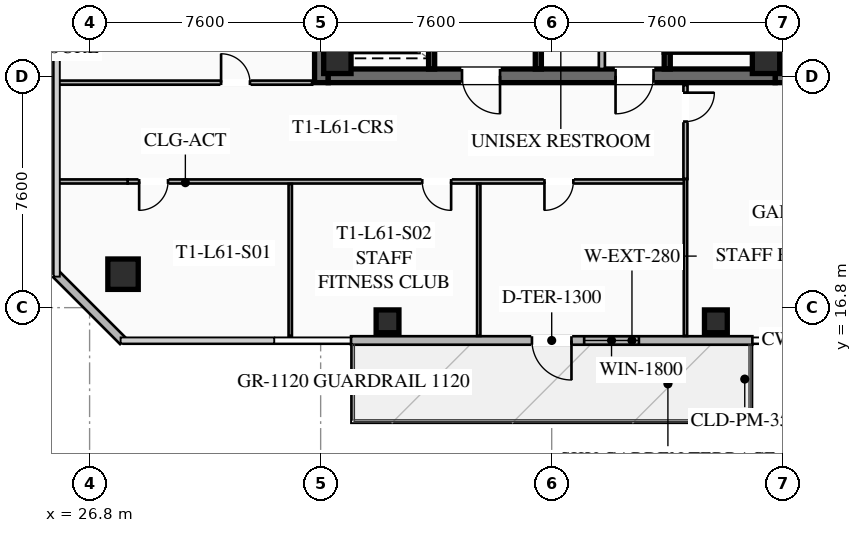
"""IFC4 building model, lengths in metres.
Left out: names, types, materials, properties, quantities, classifications, styles, units other than length and angle.
Written with IfcOpenShell. Run it as: python <this file> out.ifc"""

import sys

from ifc_helpers import new_model, si_unit, direction, frame, frame_2d, origin, origin_2d, place, context, subcontext, project, spatial, rectangle, hollow_rectangle, extrude, element, fill, save


model = new_model("IFC4")
c1 = context("Model", 3, precision=1e-05, world=origin(), true_north=direction((0.0, 1.0)))
c2 = subcontext(c1, "Body", "Model", "MODEL_VIEW")
j1 = project(units=[si_unit("LENGTHUNIT", "METRE"), si_unit("PLANEANGLEUNIT", "RADIAN")], contexts=[c1])
p1 = place(None, origin())
s1 = spatial("IfcSite", under=j1, at=p1, CompositionType="ELEMENT")
p2 = place(p1, origin())
s2 = spatial("IfcBuilding", under=s1, at=p2, CompositionType="ELEMENT")
p3 = place(p2, frame((0.0, 0.0, 225.5)))
s3 = spatial("IfcBuildingStorey", under=s2, at=p3, CompositionType="ELEMENT", Elevation=225.5)
for number, where, z_axis, x_axis in (
    (1, (34.425, 24.2, 0.0), (0.0, 0.0, 1.0), (0.0, 1.0, 0.0)),
    (2, (49.575, 39.8, 0.0), (0.0, 0.0, 1.0), (0.0, -1.0, 0.0)),
):
    element("IfcWall", number, at=place(p3, frame(where, z_axis=z_axis, x_axis=x_axis)), inside=s3, PredefinedType="SHEAR", context=c2, shape_type="SweptSolid", body=[
        extrude(rectangle(XDim=15.6, YDim=0.45, at=frame_2d((7.8, 0.0))), origin(), (0.0, 0.0, 1.0), 3.55),
    ])
p4 = place(p3, frame((49.35, 24.425, 0.0), z_axis=(0.0, 0.0, 1.0), x_axis=(-1.0, 0.0, 0.0)))
e3 = element("IfcWall", 3, at=p4, inside=s3, PredefinedType="SHEAR", context=c2, shape_type="SweptSolid", body=[
    extrude(rectangle(XDim=14.7, YDim=0.45, at=frame_2d((7.35, 0.0))), origin(), (0.0, 0.0, 1.0), 3.55),
])
p5 = place(p4, frame((9.05, 0.0, 0.0)))
e4 = element("IfcOpeningElement", 4, at=p5, cuts=e3, PredefinedType="OPENING", context=c2, shape_type="SweptSolid", body=[
    extrude(rectangle(XDim=1.25, YDim=2.25, at=frame_2d((0.625, 1.125))), frame((0.0, 0.235, 0.0), z_axis=(0.0, -1.0, 0.0), x_axis=(1.0, 0.0, 0.0)), (0.0, 0.0, 1.0), 0.47),
])
p6 = place(p4, frame((4.0, 0.0, 0.0)))
e5 = element("IfcOpeningElement", 5, at=p6, cuts=e3, PredefinedType="OPENING", context=c2, shape_type="SweptSolid", body=[
    extrude(rectangle(XDim=1.25, YDim=2.25, at=frame_2d((0.625, 1.125))), frame((0.0, 0.235, 0.0), z_axis=(0.0, -1.0, 0.0), x_axis=(1.0, 0.0, 0.0)), (0.0, 0.0, 1.0), 0.47),
])
for number, where, z_axis, x_axis in (
    (6, (34.95, 24.95, 0.0), (0.0, 0.0, 1.0), (1.0, 0.0, 0.0)),
    (7, (49.05, 24.95, 0.0), (0.0, 0.0, 1.0), (1.0, 0.0, 0.0)),
):
    element("IfcColumn", number, at=place(p3, frame(where, z_axis=z_axis, x_axis=x_axis)), inside=s3, PredefinedType="COLUMN", context=c2, shape_type="SweptSolid", body=[
        extrude(hollow_rectangle(XDim=0.9, YDim=0.9, WallThickness=0.04, at=origin_2d()), origin(), (0.0, 0.0, 1.0), 3.37),
    ])
p7 = place(p3, frame((27.9, 17.9, 0.0), z_axis=(0.0, 0.0, 1.0), x_axis=(1.0, 0.0, 0.0)))
e8 = element("IfcColumn", 8, at=p7, inside=s3, PredefinedType="COLUMN", context=c2, shape_type="SweptSolid", body=[
    extrude(hollow_rectangle(XDim=1.0, YDim=1.0, WallThickness=0.04, at=origin_2d()), origin(), (0.0, 0.0, 1.0), 3.37),
])
for number, where, z_axis, x_axis in (
    (9, (36.6, 16.35, 0.0), (0.0, 0.0, 1.0), (1.0, 0.0, 0.0)),
    (10, (47.4, 16.35, 0.0), (0.0, 0.0, 1.0), (1.0, 0.0, 0.0)),
):
    element("IfcColumn", number, at=place(p3, frame(where, z_axis=z_axis, x_axis=x_axis)), inside=s3, PredefinedType="COLUMN", context=c2, shape_type="SweptSolid", body=[
        extrude(hollow_rectangle(XDim=0.75, YDim=0.75, WallThickness=0.032, at=origin_2d()), origin(), (0.0, 0.0, 1.0), 3.37),
    ])
p8 = place(p3, frame((48.6, 15.72, 0.0), z_axis=(0.0, 0.0, 1.0), x_axis=(-1.0, 0.0, 0.0)))
e11 = element("IfcWall", 11, at=p8, inside=s3, PredefinedType="SOLIDWALL", context=c2, shape_type="SweptSolid", body=[
    extrude(rectangle(XDim=13.2, YDim=0.28, at=frame_2d((6.6, 0.0))), origin(), (0.0, 0.0, 1.0), 3.37),
])
p9 = place(p8, frame((5.95, 0.0, 0.0)))
e12 = element("IfcOpeningElement", 12, at=p9, cuts=e11, PredefinedType="OPENING", context=c2, shape_type="SweptSolid", body=[
    extrude(rectangle(XDim=1.3, YDim=2.15, at=frame_2d((0.65, 1.075))), frame((0.0, 0.15, 0.0), z_axis=(0.0, -1.0, 0.0), x_axis=(1.0, 0.0, 0.0)), (0.0, 0.0, 1.0), 0.3),
])
p10 = place(p8, frame((3.732, 0.0, 0.85)))
e13 = element("IfcOpeningElement", 13, at=p10, cuts=e11, PredefinedType="OPENING", context=c2, shape_type="SweptSolid", body=[
    extrude(rectangle(XDim=1.8, YDim=1.92, at=frame_2d((0.9, 0.96))), frame((0.0, 0.15, 0.0), z_axis=(0.0, -1.0, 0.0), x_axis=(1.0, 0.0, 0.0)), (0.0, 0.0, 1.0), 0.3),
])
p11 = place(p3, frame((27.9, 15.7, 0.0), z_axis=(0.0, 0.0, 1.0), x_axis=(-0.707106781187, 0.707106781187, 0.0)))
e14 = element("IfcWall", 14, at=p11, inside=s3, PredefinedType="SOLIDWALL", context=c2, shape_type="SweptSolid", body=[
    extrude(rectangle(XDim=3.111, YDim=0.28, at=frame_2d((1.556, 0.0))), origin(), (0.0, 0.0, 1.0), 3.37),
])
p12 = place(p3, frame((45.8, 32.8, 0.0), z_axis=(0.0, 0.0, 1.0), x_axis=(0.0, -1.0, 0.0)))
e15 = element("IfcWall", 15, at=p12, inside=s3, PredefinedType="SHEAR", context=c2, shape_type="SweptSolid", body=[
    extrude(rectangle(XDim=8.15, YDim=0.2, at=frame_2d((4.075, 0.0))), origin(), (0.0, 0.0, 1.0), 3.37),
])
p13 = place(p12, frame((0.45, 0.0, 0.0)))
e16 = element("IfcOpeningElement", 16, at=p13, cuts=e15, PredefinedType="OPENING", context=c2, shape_type="SweptSolid", body=[
    extrude(rectangle(XDim=1.15, YDim=2.2, at=frame_2d((0.575, 1.1))), frame((0.0, 0.11, 0.0), z_axis=(0.0, -1.0, 0.0), x_axis=(1.0, 0.0, 0.0)), (0.0, 0.0, 1.0), 0.22),
])
p14 = place(p3, frame((41.56, 24.65, 0.0), z_axis=(0.0, 0.0, 1.0), x_axis=(0.0, 1.0, 0.0)))
e17 = element("IfcWall", 17, at=p14, inside=s3, PredefinedType="SHEAR", context=c2, shape_type="SweptSolid", body=[
    extrude(rectangle(XDim=14.7, YDim=0.2, at=frame_2d((7.35, 0.0))), origin(), (0.0, 0.0, 1.0), 3.37),
])
p15 = place(p3, frame((38.05, 24.65, 0.0), z_axis=(0.0, 0.0, 1.0), x_axis=(0.0, 1.0, 0.0)))
e18 = element("IfcWall", 18, at=p15, inside=s3, PredefinedType="SHEAR", context=c2, shape_type="SweptSolid", body=[
    extrude(rectangle(XDim=6.55, YDim=0.2, at=frame_2d((3.275, 0.0))), origin(), (0.0, 0.0, 1.0), 3.37),
])
p16 = place(p15, frame((4.975, 0.0, 0.0)))
e19 = element("IfcOpeningElement", 19, at=p16, cuts=e18, PredefinedType="OPENING", context=c2, shape_type="SweptSolid", body=[
    extrude(rectangle(XDim=1.3, YDim=2.25, at=frame_2d((0.65, 1.125))), frame((0.0, 0.11, 0.0), z_axis=(0.0, -1.0, 0.0), x_axis=(1.0, 0.0, 0.0)), (0.0, 0.0, 1.0), 0.22),
])
p17 = place(p15, frame((2.975, 0.0, 0.0)))
e20 = element("IfcOpeningElement", 20, at=p17, cuts=e18, PredefinedType="OPENING", context=c2, shape_type="SweptSolid", body=[
    extrude(rectangle(XDim=1.3, YDim=2.25, at=frame_2d((0.65, 1.125))), frame((0.0, 0.11, 0.0), z_axis=(0.0, -1.0, 0.0), x_axis=(1.0, 0.0, 0.0)), (0.0, 0.0, 1.0), 0.22),
])
p18 = place(p15, frame((0.775, 0.0, 0.0)))
e21 = element("IfcOpeningElement", 21, at=p18, cuts=e18, PredefinedType="OPENING", context=c2, shape_type="SweptSolid", body=[
    extrude(rectangle(XDim=1.3, YDim=2.25, at=frame_2d((0.65, 1.125))), frame((0.0, 0.11, 0.0), z_axis=(0.0, -1.0, 0.0), x_axis=(1.0, 0.0, 0.0)), (0.0, 0.0, 1.0), 0.22),
])
p19 = place(p3, frame((43.65, 24.65, 0.0), z_axis=(0.0, 0.0, 1.0), x_axis=(0.0, 1.0, 0.0)))
e22 = element("IfcWall", 22, at=p19, inside=s3, PredefinedType="SOLIDWALL", context=c2, shape_type="SweptSolid", body=[
    extrude(rectangle(XDim=7.0, YDim=0.2, at=frame_2d((3.5, 0.0))), origin(), (0.0, 0.0, 1.0), 2.723),
])
p20 = place(p19, frame((0.85, 0.0, 0.0)))
e23 = element("IfcOpeningElement", 23, at=p20, cuts=e22, PredefinedType="OPENING", context=c2, shape_type="SweptSolid", body=[
    extrude(rectangle(XDim=0.95, YDim=2.05, at=frame_2d((0.475, 1.025))), frame((0.0, 0.11, 0.0), z_axis=(0.0, -1.0, 0.0), x_axis=(1.0, 0.0, 0.0)), (0.0, 0.0, 1.0), 0.22),
])
p21 = place(p19, frame((4.8, 0.0, 0.0)))
e24 = element("IfcOpeningElement", 24, at=p21, cuts=e22, PredefinedType="OPENING", context=c2, shape_type="SweptSolid", body=[
    extrude(rectangle(XDim=1.05, YDim=2.2, at=frame_2d((0.525, 1.1))), frame((0.0, 0.11, 0.0), z_axis=(0.0, -1.0, 0.0), x_axis=(1.0, 0.0, 0.0)), (0.0, 0.0, 1.0), 0.22),
])
p22 = place(p3, frame((46.4, 20.95, 0.0), z_axis=(0.0, 0.0, 1.0), x_axis=(-1.0, 0.0, 0.0)))
e25 = element("IfcWall", 25, at=p22, inside=s3, PredefinedType="PARTITIONING", context=c2, shape_type="SweptSolid", body=[
    extrude(rectangle(XDim=18.35, YDim=0.135, at=frame_2d((9.175, 0.0))), origin(), (0.0, 0.0, 1.0), 2.723),
])
p23 = place(p22, frame((17.02, 0.0, 0.0)))
e26 = element("IfcOpeningElement", 26, at=p23, cuts=e25, PredefinedType="OPENING", context=c2, shape_type="SweptSolid", body=[
    extrude(rectangle(XDim=0.95, YDim=2.05, at=frame_2d((0.475, 1.025))), frame((0.0, 0.077, 0.0), z_axis=(0.0, -1.0, 0.0), x_axis=(1.0, 0.0, 0.0)), (0.0, 0.0, 1.0), 0.155),
])
p24 = place(p22, frame((7.708, 0.0, 0.0)))
e27 = element("IfcOpeningElement", 27, at=p24, cuts=e25, PredefinedType="OPENING", context=c2, shape_type="SweptSolid", body=[
    extrude(rectangle(XDim=0.95, YDim=2.05, at=frame_2d((0.475, 1.025))), frame((0.0, 0.077, 0.0), z_axis=(0.0, -1.0, 0.0), x_axis=(1.0, 0.0, 0.0)), (0.0, 0.0, 1.0), 0.155),
])
p25 = place(p22, frame((3.688, 0.0, 0.0)))
e28 = element("IfcOpeningElement", 28, at=p25, cuts=e25, PredefinedType="OPENING", context=c2, shape_type="SweptSolid", body=[
    extrude(rectangle(XDim=0.95, YDim=2.05, at=frame_2d((0.475, 1.025))), frame((0.0, 0.077, 0.0), z_axis=(0.0, -1.0, 0.0), x_axis=(1.0, 0.0, 0.0)), (0.0, 0.0, 1.0), 0.155),
])
p26 = place(p3, frame((25.72, 20.95, 0.0), z_axis=(0.0, 0.0, 1.0), x_axis=(1.0, 0.0, 0.0)))
e29 = element("IfcWall", 29, at=p26, inside=s3, PredefinedType="PARTITIONING", context=c2, shape_type="SweptSolid", body=[
    extrude(rectangle(XDim=2.33, YDim=0.135, at=frame_2d((1.165, 0.0))), origin(), (0.0, 0.0, 1.0), 2.723),
])
p27 = place(p3, frame((46.4, 24.12, 0.0), z_axis=(0.0, 0.0, 1.0), x_axis=(0.0, -1.0, 0.0)))
e30 = element("IfcWall", 30, at=p27, inside=s3, PredefinedType="PARTITIONING", context=c2, shape_type="SweptSolid", body=[
    extrude(rectangle(XDim=3.09, YDim=0.135, at=frame_2d((1.545, 0.0))), origin(), (0.0, 0.0, 1.0), 2.723),
])
p28 = place(p27, frame((0.25, 0.0, 0.0)))
e31 = element("IfcOpeningElement", 31, at=p28, cuts=e30, PredefinedType="OPENING", context=c2, shape_type="SweptSolid", body=[
    extrude(rectangle(XDim=0.95, YDim=2.05, at=frame_2d((0.475, 1.025))), frame((0.0, 0.077, 0.0), z_axis=(0.0, -1.0, 0.0), x_axis=(1.0, 0.0, 0.0)), (0.0, 0.0, 1.0), 0.155),
])
for number, where, z_axis, x_axis in (
    (32, (33.4, 15.87, 0.0), (0.0, 0.0, 1.0), (0.0, 1.0, 0.0)),
    (33, (39.6, 15.87, 0.0), (0.0, 0.0, 1.0), (0.0, 1.0, 0.0)),
):
    element("IfcWall", number, at=place(p3, frame(where, z_axis=z_axis, x_axis=x_axis)), inside=s3, PredefinedType="PARTITIONING", context=c2, shape_type="SweptSolid", body=[
        extrude(rectangle(XDim=5.0, YDim=0.11, at=frame_2d((2.5, 0.0))), origin(), (0.0, 0.0, 1.0), 2.723),
    ])
p29 = place(p3, frame((46.4, 15.87, 0.0), z_axis=(0.0, 0.0, 1.0), x_axis=(0.0, 1.0, 0.0)))
e34 = element("IfcWall", 34, at=p29, inside=s3, PredefinedType="PARTITIONING", context=c2, shape_type="SweptSolid", body=[
    extrude(rectangle(XDim=5.16, YDim=0.11, at=frame_2d((2.58, 0.0))), origin(), (0.0, 0.0, 1.0), 2.723),
])
p30 = place(p3, frame((25.72, 24.2, 0.0), z_axis=(0.0, 0.0, 1.0), x_axis=(1.0, 0.0, 0.0)))
e35 = element("IfcWall", 35, at=p30, inside=s3, PredefinedType="PARTITIONING", context=c2, shape_type="SweptSolid", body=[
    extrude(rectangle(XDim=8.4, YDim=0.135, at=frame_2d((4.2, 0.0))), origin(), (0.0, 0.0, 1.0), 2.723),
])
p31 = place(p30, frame((5.405, 0.0, 0.0)))
e36 = element("IfcOpeningElement", 36, at=p31, cuts=e35, PredefinedType="OPENING", context=c2, shape_type="SweptSolid", body=[
    extrude(rectangle(XDim=0.95, YDim=2.05, at=frame_2d((0.475, 1.025))), frame((0.0, 0.077, 0.0), z_axis=(0.0, -1.0, 0.0), x_axis=(1.0, 0.0, 0.0)), (0.0, 0.0, 1.0), 0.155),
])
p32 = place(p9, origin())
e37 = element("IfcDoor", 37, at=p32, inside=s3, OperationType="SINGLE_SWING_LEFT", PredefinedType="DOOR", context=c2, shape_type="SweptSolid", body=[
    extrude(rectangle(XDim=1.3, YDim=2.15, at=frame_2d((0.65, 1.075))), frame((0.0, 0.025, 0.0), z_axis=(0.0, -1.0, 0.0), x_axis=(1.0, 0.0, 0.0)), (0.0, 0.0, 1.0), 0.05),
])
fill(e12, e37)
p33 = place(p10, origin())
e38 = element("IfcWindow", 38, at=p33, inside=s3, PartitioningType="SINGLE_PANEL", PredefinedType="WINDOW", context=c2, shape_type="SweptSolid", body=[
    extrude(rectangle(XDim=1.8, YDim=1.92, at=frame_2d((0.9, 0.96))), frame((0.0, 0.03, 0.0), z_axis=(0.0, -1.0, 0.0), x_axis=(1.0, 0.0, 0.0)), (0.0, 0.0, 1.0), 0.06),
])
fill(e13, e38)
p34 = place(p5, origin())
e39 = element("IfcDoor", 39, at=p34, inside=s3, OperationType="SINGLE_SWING_LEFT", PredefinedType="DOOR", context=c2, shape_type="SweptSolid", body=[
    extrude(rectangle(XDim=1.25, YDim=2.25, at=frame_2d((0.625, 1.125))), frame((0.0, 0.025, 0.0), z_axis=(0.0, -1.0, 0.0), x_axis=(1.0, 0.0, 0.0)), (0.0, 0.0, 1.0), 0.05),
])
fill(e4, e39)
p35 = place(p6, origin())
e40 = element("IfcDoor", 40, at=p35, inside=s3, OperationType="SINGLE_SWING_RIGHT", PredefinedType="DOOR", context=c2, shape_type="SweptSolid", body=[
    extrude(rectangle(XDim=1.25, YDim=2.25, at=frame_2d((0.625, 1.125))), frame((0.0, 0.025, 0.0), z_axis=(0.0, -1.0, 0.0), x_axis=(1.0, 0.0, 0.0)), (0.0, 0.0, 1.0), 0.05),
])
fill(e5, e40)
p36 = place(p23, origin())
e41 = element("IfcDoor", 41, at=p36, inside=s3, OperationType="SINGLE_SWING_RIGHT", PredefinedType="DOOR", context=c2, shape_type="SweptSolid", body=[
    extrude(rectangle(XDim=0.95, YDim=2.05, at=frame_2d((0.475, 1.025))), frame((0.0, 0.025, 0.0), z_axis=(0.0, -1.0, 0.0), x_axis=(1.0, 0.0, 0.0)), (0.0, 0.0, 1.0), 0.05),
])
fill(e26, e41)
p37 = place(p24, origin())
e42 = element("IfcDoor", 42, at=p37, inside=s3, OperationType="SINGLE_SWING_LEFT", PredefinedType="DOOR", context=c2, shape_type="SweptSolid", body=[
    extrude(rectangle(XDim=0.95, YDim=2.05, at=frame_2d((0.475, 1.025))), frame((0.0, 0.025, 0.0), z_axis=(0.0, -1.0, 0.0), x_axis=(1.0, 0.0, 0.0)), (0.0, 0.0, 1.0), 0.05),
])
fill(e27, e42)
p38 = place(p25, origin())
e43 = element("IfcDoor", 43, at=p38, inside=s3, OperationType="SINGLE_SWING_RIGHT", PredefinedType="DOOR", context=c2, shape_type="SweptSolid", body=[
    extrude(rectangle(XDim=0.95, YDim=2.05, at=frame_2d((0.475, 1.025))), frame((0.0, 0.025, 0.0), z_axis=(0.0, -1.0, 0.0), x_axis=(1.0, 0.0, 0.0)), (0.0, 0.0, 1.0), 0.05),
])
fill(e28, e43)
p39 = place(p28, origin())
e44 = element("IfcDoor", 44, at=p39, inside=s3, OperationType="SINGLE_SWING_LEFT", PredefinedType="DOOR", context=c2, shape_type="SweptSolid", body=[
    extrude(rectangle(XDim=0.95, YDim=2.05, at=frame_2d((0.475, 1.025))), frame((0.0, 0.025, 0.0), z_axis=(0.0, -1.0, 0.0), x_axis=(1.0, 0.0, 0.0)), (0.0, 0.0, 1.0), 0.05),
])
fill(e31, e44)
p40 = place(p31, origin())
e45 = element("IfcDoor", 45, at=p40, inside=s3, OperationType="SINGLE_SWING_LEFT", PredefinedType="DOOR", context=c2, shape_type="SweptSolid", body=[
    extrude(rectangle(XDim=0.95, YDim=2.05, at=frame_2d((0.475, 1.025))), frame((0.0, 0.025, 0.0), z_axis=(0.0, -1.0, 0.0), x_axis=(1.0, 0.0, 0.0)), (0.0, 0.0, 1.0), 0.05),
])
fill(e36, e45)
save(model, sys.argv[1])
